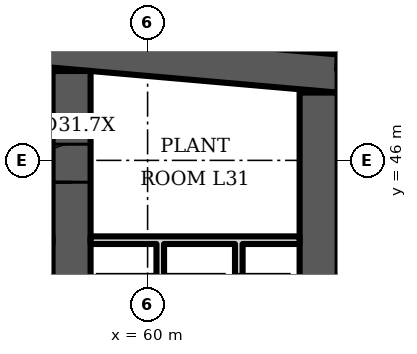
"""IFC4 building model, lengths in metres.
Left out: names, types, materials, properties, quantities, classifications, styles, units other than length and angle.
Written with IfcOpenShell. Run it as: python <this file> out.ifc"""

import sys

from ifc_helpers import new_model, si_unit, direction, frame, frame_2d, origin, place, context, subcontext, project, spatial, polyline, rectangle, outline, extrude, element, fill, save


model = new_model("IFC4")
c1 = context("Model", 3, precision=1e-05, world=origin(), true_north=direction((0.0, 1.0)))
c2 = subcontext(c1, "Body", "Model", "MODEL_VIEW")
j1 = project(units=[si_unit("LENGTHUNIT", "METRE"), si_unit("PLANEANGLEUNIT", "RADIAN")], contexts=[c1])
p1 = place(None, origin())
s1 = spatial("IfcSite", under=j1, at=p1, CompositionType="ELEMENT")
p2 = place(p1, origin())
s2 = spatial("IfcBuilding", under=s1, at=p2, CompositionType="ELEMENT")
p3 = place(p2, frame((0.0, 0.0, 132.7)))
s3 = spatial("IfcBuildingStorey", under=s2, at=p3, CompositionType="ELEMENT", Elevation=132.7)
p4 = place(p3, origin())
e1 = element("IfcWall", 1, at=p4, inside=s3, PredefinedType="SHEAR", context=c2, shape_type="SweptSolid", body=[
    extrude(outline(polyline([(16.0, 47.784), (40.5, 49.927), (65.0, 47.784), (65.0, 48.787), (40.5, 50.931), (16.0, 48.787), (16.0, 47.784)])), origin(), (0.0, 0.0, 1.0), 3.6),
])
p5 = place(p3, frame((58.0, 35.0, 0.0), z_axis=(0.0, 0.0, 1.0), x_axis=(0.0, 1.0, 0.0)))
e2 = element("IfcWall", 2, at=p5, inside=s3, PredefinedType="SHEAR", context=c2, shape_type="SweptSolid", body=[
    extrude(rectangle(XDim=13.352, YDim=1.0, at=frame_2d((6.676, 0.0))), origin(), (0.0, 0.0, 1.0), 3.6),
])
p6 = place(p5, frame((10.426, 0.0, 0.0)))
e3 = element("IfcOpeningElement", 3, at=p6, cuts=e2, PredefinedType="OPENING", context=c2, shape_type="SweptSolid", body=[
    extrude(rectangle(XDim=1.0, YDim=2.1, at=frame_2d((0.5, 1.05))), frame((0.0, 0.51, 0.0), z_axis=(0.0, -1.0, 0.0), x_axis=(1.0, 0.0, 0.0)), (0.0, 0.0, 1.0), 1.02),
])
p7 = place(p5, frame((3.4, 0.0, 0.0)))
e4 = element("IfcOpeningElement", 4, at=p7, cuts=e2, PredefinedType="OPENING", context=c2, shape_type="SweptSolid", body=[
    extrude(rectangle(XDim=1.1, YDim=2.1, at=frame_2d((0.55, 1.05))), frame((0.0, 0.51, 0.0), z_axis=(0.0, -1.0, 0.0), x_axis=(1.0, 0.0, 0.0)), (0.0, 0.0, 1.0), 1.02),
])
p8 = place(p3, frame((64.5, 35.0, 0.0), z_axis=(0.0, 0.0, 1.0), x_axis=(0.0, 1.0, 0.0)))
e5 = element("IfcWall", 5, at=p8, inside=s3, PredefinedType="SHEAR", context=c2, shape_type="SweptSolid", body=[
    extrude(rectangle(XDim=12.784, YDim=1.0, at=frame_2d((6.392, 0.0))), origin(), (0.0, 0.0, 1.0), 3.6),
])
p9 = place(p3, frame((67.983, 48.326, 0.0), z_axis=(0.0, 0.0, 1.0), x_axis=(-0.996194, 0.087168, 0.0)))
e6 = element("IfcWall", 6, at=p9, inside=s3, PredefinedType="SOLIDWALL", context=c2, shape_type="SweptSolid", body=[
    extrude(rectangle(XDim=2.994, YDim=0.4, at=frame_2d((1.497, 0.0))), origin(), (0.0, 0.0, 1.0), 3.2),
])
p10 = place(p3, frame((0.0, 0.0, -0.0)))
e7 = element("IfcWall", 7, at=p10, inside=s3, PredefinedType="PARTITIONING", context=c2, shape_type="SweptSolid", body=[
    extrude(outline(polyline([(60.433, 40.8), (60.233, 40.8), (60.233, 43.8), (58.5, 43.8), (58.5, 44.0), (64.0, 44.0), (64.0, 43.8), (62.5, 43.8), (62.5, 40.8), (62.3, 40.8), (62.3, 43.8), (60.433, 43.8), (60.433, 40.8)])), origin(), (0.0, 0.0, 1.0), 3.2),
])
p11 = place(p6, origin())
e8 = element("IfcDoor", 8, at=p11, inside=s3, OperationType="SINGLE_SWING_LEFT", PredefinedType="DOOR", context=c2, shape_type="SweptSolid", body=[
    extrude(rectangle(XDim=1.0, YDim=2.1, at=frame_2d((0.5, 1.05))), frame((0.0, 0.5, 0.0), z_axis=(0.0, -1.0, 0.0), x_axis=(1.0, 0.0, 0.0)), (0.0, 0.0, 1.0), 1.0),
])
fill(e3, e8)
save(model, sys.argv[1])
